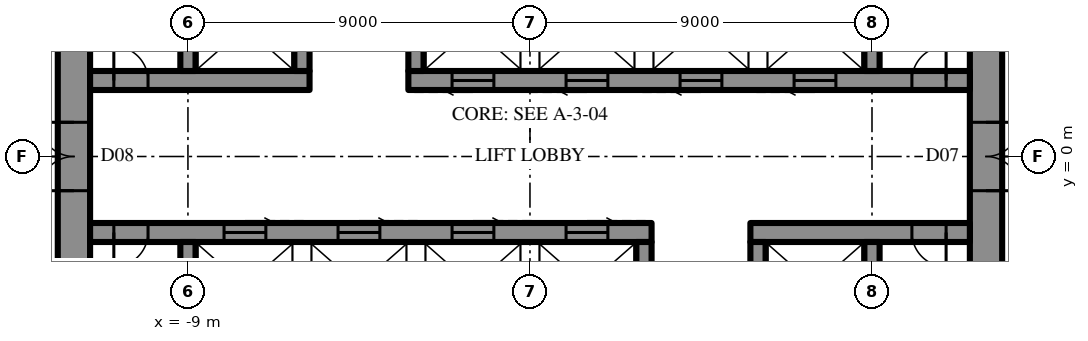
"""IFC4 building model, lengths in metres.
Left out: names, types, materials, properties, quantities, classifications, styles, units other than length and angle.
Written with IfcOpenShell. Run it as: python <this file> out.ifc"""

import sys

from ifc_helpers import new_model, si_unit, direction, frame, frame_2d, origin, place, context, subcontext, project, spatial, rectangle, extrude, element, fill, save


model = new_model("IFC4")
c1 = context("Model", 3, precision=1e-05, world=origin(), true_north=direction((0.0, 1.0)))
c2 = subcontext(c1, "Body", "Model", "MODEL_VIEW")
j1 = project(units=[si_unit("LENGTHUNIT", "METRE"), si_unit("PLANEANGLEUNIT", "RADIAN")], contexts=[c1])
p1 = place(None, origin())
s1 = spatial("IfcSite", under=j1, at=p1, CompositionType="ELEMENT")
p2 = place(p1, origin())
s2 = spatial("IfcBuilding", under=s1, at=p2, CompositionType="ELEMENT")
p3 = place(p2, frame((0.0, 0.0, 374.5)))
s3 = spatial("IfcBuildingStorey", under=s2, at=p3, CompositionType="ELEMENT", Elevation=374.5)
p4 = place(p3, frame((12.0, -10.7, 0.0), z_axis=(0.0, 0.0, 1.0), x_axis=(0.0, 1.0, 0.0)))
e1 = element("IfcWall", 1, at=p4, inside=s3, PredefinedType="SHEAR", context=c2, shape_type="SweptSolid", body=[
    extrude(rectangle(XDim=21.4, YDim=0.85, at=frame_2d((10.7, 0.0))), origin(), (0.0, 0.0, 1.0), 4.2),
])
p5 = place(p4, frame((9.8, 0.0, 0.0)))
e2 = element("IfcOpeningElement", 2, at=p5, cuts=e1, PredefinedType="OPENING", context=c2, shape_type="SweptSolid", body=[
    extrude(rectangle(XDim=1.8, YDim=2.4, at=frame_2d((0.9, 1.2))), frame((0.0, 0.435, 0.0), z_axis=(0.0, -1.0, 0.0), x_axis=(1.0, 0.0, 0.0)), (0.0, 0.0, 1.0), 0.87),
])
p6 = place(p3, frame((-12.0, 10.7, 0.0), z_axis=(0.0, 0.0, 1.0), x_axis=(0.0, -1.0, 0.0)))
e3 = element("IfcWall", 3, at=p6, inside=s3, PredefinedType="SHEAR", context=c2, shape_type="SweptSolid", body=[
    extrude(rectangle(XDim=21.4, YDim=0.85, at=frame_2d((10.7, 0.0))), origin(), (0.0, 0.0, 1.0), 4.2),
])
p7 = place(p6, frame((9.8, 0.0, 0.0)))
e4 = element("IfcOpeningElement", 4, at=p7, cuts=e3, PredefinedType="OPENING", context=c2, shape_type="SweptSolid", body=[
    extrude(rectangle(XDim=1.8, YDim=2.4, at=frame_2d((0.9, 1.2))), frame((0.0, 0.435, 0.0), z_axis=(0.0, -1.0, 0.0), x_axis=(1.0, 0.0, 0.0)), (0.0, 0.0, 1.0), 0.87),
])
p8 = place(p3, frame((-11.575, 2.0, 0.0), z_axis=(0.0, 0.0, 1.0), x_axis=(1.0, 0.0, 0.0)))
e5 = element("IfcWall", 5, at=p8, inside=s3, PredefinedType="SHEAR", context=c2, shape_type="SweptSolid", body=[
    extrude(rectangle(XDim=5.775, YDim=0.5, at=frame_2d((2.887, 0.0))), origin(), (0.0, 0.0, 1.0), 4.2),
])
p9 = place(p8, frame((0.625, 0.0, 0.0)))
e6 = element("IfcOpeningElement", 6, at=p9, cuts=e5, PredefinedType="OPENING", context=c2, shape_type="SweptSolid", body=[
    extrude(rectangle(XDim=0.9, YDim=2.2, at=frame_2d((0.45, 1.1))), frame((0.0, 0.26, 0.0), z_axis=(0.0, -1.0, 0.0), x_axis=(1.0, 0.0, 0.0)), (0.0, 0.0, 1.0), 0.52),
])
p10 = place(p3, frame((-3.2, 2.0, 0.0), z_axis=(0.0, 0.0, 1.0), x_axis=(1.0, 0.0, 0.0)))
e7 = element("IfcWall", 7, at=p10, inside=s3, PredefinedType="SHEAR", context=c2, shape_type="SweptSolid", body=[
    extrude(rectangle(XDim=14.775, YDim=0.5, at=frame_2d((7.387, 0.0))), origin(), (0.0, 0.0, 1.0), 4.2),
])
p11 = place(p10, frame((13.25, 0.0, 0.0)))
e8 = element("IfcOpeningElement", 8, at=p11, cuts=e7, PredefinedType="OPENING", context=c2, shape_type="SweptSolid", body=[
    extrude(rectangle(XDim=0.9, YDim=2.2, at=frame_2d((0.45, 1.1))), frame((0.0, 0.26, 0.0), z_axis=(0.0, -1.0, 0.0), x_axis=(1.0, 0.0, 0.0)), (0.0, 0.0, 1.0), 0.52),
])
p12 = place(p10, frame((1.15, 0.0, 0.0)))
e9 = element("IfcOpeningElement", 9, at=p12, cuts=e7, PredefinedType="OPENING", context=c2, shape_type="SweptSolid", body=[
    extrude(rectangle(XDim=1.1, YDim=2.2, at=frame_2d((0.55, 1.1))), frame((0.0, 0.26, 0.0), z_axis=(0.0, -1.0, 0.0), x_axis=(1.0, 0.0, 0.0)), (0.0, 0.0, 1.0), 0.52),
])
p13 = place(p10, frame((4.15, 0.0, 0.0)))
e10 = element("IfcOpeningElement", 10, at=p13, cuts=e7, PredefinedType="OPENING", context=c2, shape_type="SweptSolid", body=[
    extrude(rectangle(XDim=1.1, YDim=2.2, at=frame_2d((0.55, 1.1))), frame((0.0, 0.26, 0.0), z_axis=(0.0, -1.0, 0.0), x_axis=(1.0, 0.0, 0.0)), (0.0, 0.0, 1.0), 0.52),
])
p14 = place(p10, frame((7.15, 0.0, 0.0)))
e11 = element("IfcOpeningElement", 11, at=p14, cuts=e7, PredefinedType="OPENING", context=c2, shape_type="SweptSolid", body=[
    extrude(rectangle(XDim=1.1, YDim=2.2, at=frame_2d((0.55, 1.1))), frame((0.0, 0.26, 0.0), z_axis=(0.0, -1.0, 0.0), x_axis=(1.0, 0.0, 0.0)), (0.0, 0.0, 1.0), 0.52),
])
p15 = place(p10, frame((10.15, 0.0, 0.0)))
e12 = element("IfcOpeningElement", 12, at=p15, cuts=e7, PredefinedType="OPENING", context=c2, shape_type="SweptSolid", body=[
    extrude(rectangle(XDim=1.1, YDim=2.2, at=frame_2d((0.55, 1.1))), frame((0.0, 0.26, 0.0), z_axis=(0.0, -1.0, 0.0), x_axis=(1.0, 0.0, 0.0)), (0.0, 0.0, 1.0), 0.52),
])
for number, where, z_axis, x_axis in (
    (13, (-9.0, 2.25, 0.0), (0.0, 0.0, 1.0), (0.0, 1.0, 0.0)),
    (14, (-6.0, 2.25, 0.0), (0.0, 0.0, 1.0), (0.0, 1.0, 0.0)),
    (15, (-3.0, 2.25, 0.0), (0.0, 0.0, 1.0), (0.0, 1.0, 0.0)),
    (16, (9.0, 2.25, 0.0), (0.0, 0.0, 1.0), (0.0, 1.0, 0.0)),
):
    element("IfcWall", number, at=place(p3, frame(where, z_axis=z_axis, x_axis=x_axis)), inside=s3, PredefinedType="SHEAR", context=c2, shape_type="SweptSolid", body=[
        extrude(rectangle(XDim=2.3, YDim=0.4, at=frame_2d((1.15, 0.0))), origin(), (0.0, 0.0, 1.0), 4.2),
    ])
p16 = place(p3, frame((11.575, -2.0, 0.0), z_axis=(0.0, 0.0, 1.0), x_axis=(-1.0, 0.0, 0.0)))
e17 = element("IfcWall", 17, at=p16, inside=s3, PredefinedType="SHEAR", context=c2, shape_type="SweptSolid", body=[
    extrude(rectangle(XDim=5.775, YDim=0.5, at=frame_2d((2.887, 0.0))), origin(), (0.0, 0.0, 1.0), 4.2),
])
p17 = place(p16, frame((0.625, 0.0, 0.0)))
e18 = element("IfcOpeningElement", 18, at=p17, cuts=e17, PredefinedType="OPENING", context=c2, shape_type="SweptSolid", body=[
    extrude(rectangle(XDim=0.9, YDim=2.2, at=frame_2d((0.45, 1.1))), frame((0.0, 0.26, 0.0), z_axis=(0.0, -1.0, 0.0), x_axis=(1.0, 0.0, 0.0)), (0.0, 0.0, 1.0), 0.52),
])
p18 = place(p3, frame((3.2, -2.0, 0.0), z_axis=(0.0, 0.0, 1.0), x_axis=(-1.0, 0.0, 0.0)))
e19 = element("IfcWall", 19, at=p18, inside=s3, PredefinedType="SHEAR", context=c2, shape_type="SweptSolid", body=[
    extrude(rectangle(XDim=14.775, YDim=0.5, at=frame_2d((7.387, 0.0))), origin(), (0.0, 0.0, 1.0), 4.2),
])
p19 = place(p18, frame((13.25, 0.0, 0.0)))
e20 = element("IfcOpeningElement", 20, at=p19, cuts=e19, PredefinedType="OPENING", context=c2, shape_type="SweptSolid", body=[
    extrude(rectangle(XDim=0.9, YDim=2.2, at=frame_2d((0.45, 1.1))), frame((0.0, 0.26, 0.0), z_axis=(0.0, -1.0, 0.0), x_axis=(1.0, 0.0, 0.0)), (0.0, 0.0, 1.0), 0.52),
])
p20 = place(p18, frame((1.15, 0.0, 0.0)))
e21 = element("IfcOpeningElement", 21, at=p20, cuts=e19, PredefinedType="OPENING", context=c2, shape_type="SweptSolid", body=[
    extrude(rectangle(XDim=1.1, YDim=2.2, at=frame_2d((0.55, 1.1))), frame((0.0, 0.26, 0.0), z_axis=(0.0, -1.0, 0.0), x_axis=(1.0, 0.0, 0.0)), (0.0, 0.0, 1.0), 0.52),
])
p21 = place(p18, frame((4.15, 0.0, 0.0)))
e22 = element("IfcOpeningElement", 22, at=p21, cuts=e19, PredefinedType="OPENING", context=c2, shape_type="SweptSolid", body=[
    extrude(rectangle(XDim=1.1, YDim=2.2, at=frame_2d((0.55, 1.1))), frame((0.0, 0.26, 0.0), z_axis=(0.0, -1.0, 0.0), x_axis=(1.0, 0.0, 0.0)), (0.0, 0.0, 1.0), 0.52),
])
p22 = place(p18, frame((7.15, 0.0, 0.0)))
e23 = element("IfcOpeningElement", 23, at=p22, cuts=e19, PredefinedType="OPENING", context=c2, shape_type="SweptSolid", body=[
    extrude(rectangle(XDim=1.1, YDim=2.2, at=frame_2d((0.55, 1.1))), frame((0.0, 0.26, 0.0), z_axis=(0.0, -1.0, 0.0), x_axis=(1.0, 0.0, 0.0)), (0.0, 0.0, 1.0), 0.52),
])
p23 = place(p18, frame((10.15, 0.0, 0.0)))
e24 = element("IfcOpeningElement", 24, at=p23, cuts=e19, PredefinedType="OPENING", context=c2, shape_type="SweptSolid", body=[
    extrude(rectangle(XDim=1.1, YDim=2.2, at=frame_2d((0.55, 1.1))), frame((0.0, 0.26, 0.0), z_axis=(0.0, -1.0, 0.0), x_axis=(1.0, 0.0, 0.0)), (0.0, 0.0, 1.0), 0.52),
])
for number, where, z_axis, x_axis in (
    (25, (9.0, -2.25, 0.0), (0.0, 0.0, 1.0), (0.0, -1.0, 0.0)),
    (26, (6.0, -2.25, 0.0), (0.0, 0.0, 1.0), (0.0, -1.0, 0.0)),
    (27, (3.0, -2.25, 0.0), (0.0, 0.0, 1.0), (0.0, -1.0, 0.0)),
    (28, (-9.0, -2.25, 0.0), (0.0, 0.0, 1.0), (0.0, -1.0, 0.0)),
):
    element("IfcWall", number, at=place(p3, frame(where, z_axis=z_axis, x_axis=x_axis)), inside=s3, PredefinedType="SHEAR", context=c2, shape_type="SweptSolid", body=[
        extrude(rectangle(XDim=2.3, YDim=0.4, at=frame_2d((1.15, 0.0))), origin(), (0.0, 0.0, 1.0), 4.2),
    ])
p24 = place(p5, frame((1.8, 0.0, 0.0), z_axis=(0.0, 0.0, 1.0), x_axis=(-1.0, 0.0, 0.0)))
e29 = element("IfcDoor", 29, at=p24, inside=s3, OperationType="DOUBLE_DOOR_SINGLE_SWING", PredefinedType="DOOR", context=c2, shape_type="SweptSolid", body=[
    extrude(rectangle(XDim=1.8, YDim=2.4, at=frame_2d((0.9, 1.2))), frame((0.0, 0.025, 0.0), z_axis=(0.0, -1.0, 0.0), x_axis=(1.0, 0.0, 0.0)), (0.0, 0.0, 1.0), 0.05),
])
fill(e2, e29)
p25 = place(p7, frame((1.8, 0.0, 0.0), z_axis=(0.0, 0.0, 1.0), x_axis=(-1.0, 0.0, 0.0)))
e30 = element("IfcDoor", 30, at=p25, inside=s3, OperationType="DOUBLE_DOOR_SINGLE_SWING", PredefinedType="DOOR", context=c2, shape_type="SweptSolid", body=[
    extrude(rectangle(XDim=1.8, YDim=2.4, at=frame_2d((0.9, 1.2))), frame((0.0, 0.025, 0.0), z_axis=(0.0, -1.0, 0.0), x_axis=(1.0, 0.0, 0.0)), (0.0, 0.0, 1.0), 0.05),
])
fill(e4, e30)
p26 = place(p9, origin())
e31 = element("IfcDoor", 31, at=p26, inside=s3, OperationType="SINGLE_SWING_RIGHT", PredefinedType="DOOR", context=c2, shape_type="SweptSolid", body=[
    extrude(rectangle(XDim=0.9, YDim=2.2, at=frame_2d((0.45, 1.1))), frame((0.0, 0.025, 0.0), z_axis=(0.0, -1.0, 0.0), x_axis=(1.0, 0.0, 0.0)), (0.0, 0.0, 1.0), 0.05),
])
fill(e6, e31)
p27 = place(p11, origin())
e32 = element("IfcDoor", 32, at=p27, inside=s3, OperationType="SINGLE_SWING_LEFT", PredefinedType="DOOR", context=c2, shape_type="SweptSolid", body=[
    extrude(rectangle(XDim=0.9, YDim=2.2, at=frame_2d((0.45, 1.1))), frame((0.0, 0.025, 0.0), z_axis=(0.0, -1.0, 0.0), x_axis=(1.0, 0.0, 0.0)), (0.0, 0.0, 1.0), 0.05),
])
fill(e8, e32)
p28 = place(p17, origin())
e33 = element("IfcDoor", 33, at=p28, inside=s3, OperationType="SINGLE_SWING_RIGHT", PredefinedType="DOOR", context=c2, shape_type="SweptSolid", body=[
    extrude(rectangle(XDim=0.9, YDim=2.2, at=frame_2d((0.45, 1.1))), frame((0.0, 0.025, 0.0), z_axis=(0.0, -1.0, 0.0), x_axis=(1.0, 0.0, 0.0)), (0.0, 0.0, 1.0), 0.05),
])
fill(e18, e33)
p29 = place(p19, origin())
e34 = element("IfcDoor", 34, at=p29, inside=s3, OperationType="SINGLE_SWING_LEFT", PredefinedType="DOOR", context=c2, shape_type="SweptSolid", body=[
    extrude(rectangle(XDim=0.9, YDim=2.2, at=frame_2d((0.45, 1.1))), frame((0.0, 0.025, 0.0), z_axis=(0.0, -1.0, 0.0), x_axis=(1.0, 0.0, 0.0)), (0.0, 0.0, 1.0), 0.05),
])
fill(e20, e34)
p30 = place(p12, frame((1.1, 0.0, 0.0), z_axis=(0.0, 0.0, 1.0), x_axis=(-1.0, 0.0, 0.0)))
e35 = element("IfcDoor", 35, at=p30, inside=s3, OperationType="SLIDING_TO_LEFT", PredefinedType="DOOR", context=c2, shape_type="SweptSolid", body=[
    extrude(rectangle(XDim=1.1, YDim=2.2, at=frame_2d((0.55, 1.1))), frame((0.0, 0.025, 0.0), z_axis=(0.0, -1.0, 0.0), x_axis=(1.0, 0.0, 0.0)), (0.0, 0.0, 1.0), 0.05),
])
fill(e9, e35)
p31 = place(p13, frame((1.1, 0.0, 0.0), z_axis=(0.0, 0.0, 1.0), x_axis=(-1.0, 0.0, 0.0)))
e36 = element("IfcDoor", 36, at=p31, inside=s3, OperationType="SLIDING_TO_LEFT", PredefinedType="DOOR", context=c2, shape_type="SweptSolid", body=[
    extrude(rectangle(XDim=1.1, YDim=2.2, at=frame_2d((0.55, 1.1))), frame((0.0, 0.025, 0.0), z_axis=(0.0, -1.0, 0.0), x_axis=(1.0, 0.0, 0.0)), (0.0, 0.0, 1.0), 0.05),
])
fill(e10, e36)
p32 = place(p14, frame((1.1, 0.0, 0.0), z_axis=(0.0, 0.0, 1.0), x_axis=(-1.0, 0.0, 0.0)))
e37 = element("IfcDoor", 37, at=p32, inside=s3, OperationType="SLIDING_TO_LEFT", PredefinedType="DOOR", context=c2, shape_type="SweptSolid", body=[
    extrude(rectangle(XDim=1.1, YDim=2.2, at=frame_2d((0.55, 1.1))), frame((0.0, 0.025, 0.0), z_axis=(0.0, -1.0, 0.0), x_axis=(1.0, 0.0, 0.0)), (0.0, 0.0, 1.0), 0.05),
])
fill(e11, e37)
p33 = place(p15, frame((1.1, 0.0, 0.0), z_axis=(0.0, 0.0, 1.0), x_axis=(-1.0, 0.0, 0.0)))
e38 = element("IfcDoor", 38, at=p33, inside=s3, OperationType="SLIDING_TO_LEFT", PredefinedType="DOOR", context=c2, shape_type="SweptSolid", body=[
    extrude(rectangle(XDim=1.1, YDim=2.2, at=frame_2d((0.55, 1.1))), frame((0.0, 0.025, 0.0), z_axis=(0.0, -1.0, 0.0), x_axis=(1.0, 0.0, 0.0)), (0.0, 0.0, 1.0), 0.05),
])
fill(e12, e38)
p34 = place(p20, frame((1.1, 0.0, 0.0), z_axis=(0.0, 0.0, 1.0), x_axis=(-1.0, 0.0, 0.0)))
e39 = element("IfcDoor", 39, at=p34, inside=s3, OperationType="SLIDING_TO_LEFT", PredefinedType="DOOR", context=c2, shape_type="SweptSolid", body=[
    extrude(rectangle(XDim=1.1, YDim=2.2, at=frame_2d((0.55, 1.1))), frame((0.0, 0.025, 0.0), z_axis=(0.0, -1.0, 0.0), x_axis=(1.0, 0.0, 0.0)), (0.0, 0.0, 1.0), 0.05),
])
fill(e21, e39)
p35 = place(p21, frame((1.1, 0.0, 0.0), z_axis=(0.0, 0.0, 1.0), x_axis=(-1.0, 0.0, 0.0)))
e40 = element("IfcDoor", 40, at=p35, inside=s3, OperationType="SLIDING_TO_LEFT", PredefinedType="DOOR", context=c2, shape_type="SweptSolid", body=[
    extrude(rectangle(XDim=1.1, YDim=2.2, at=frame_2d((0.55, 1.1))), frame((0.0, 0.025, 0.0), z_axis=(0.0, -1.0, 0.0), x_axis=(1.0, 0.0, 0.0)), (0.0, 0.0, 1.0), 0.05),
])
fill(e22, e40)
p36 = place(p22, frame((1.1, 0.0, 0.0), z_axis=(0.0, 0.0, 1.0), x_axis=(-1.0, 0.0, 0.0)))
e41 = element("IfcDoor", 41, at=p36, inside=s3, OperationType="SLIDING_TO_LEFT", PredefinedType="DOOR", context=c2, shape_type="SweptSolid", body=[
    extrude(rectangle(XDim=1.1, YDim=2.2, at=frame_2d((0.55, 1.1))), frame((0.0, 0.025, 0.0), z_axis=(0.0, -1.0, 0.0), x_axis=(1.0, 0.0, 0.0)), (0.0, 0.0, 1.0), 0.05),
])
fill(e23, e41)
p37 = place(p23, frame((1.1, 0.0, 0.0), z_axis=(0.0, 0.0, 1.0), x_axis=(-1.0, 0.0, 0.0)))
e42 = element("IfcDoor", 42, at=p37, inside=s3, OperationType="SLIDING_TO_LEFT", PredefinedType="DOOR", context=c2, shape_type="SweptSolid", body=[
    extrude(rectangle(XDim=1.1, YDim=2.2, at=frame_2d((0.55, 1.1))), frame((0.0, 0.025, 0.0), z_axis=(0.0, -1.0, 0.0), x_axis=(1.0, 0.0, 0.0)), (0.0, 0.0, 1.0), 0.05),
])
fill(e24, e42)
save(model, sys.argv[1])
